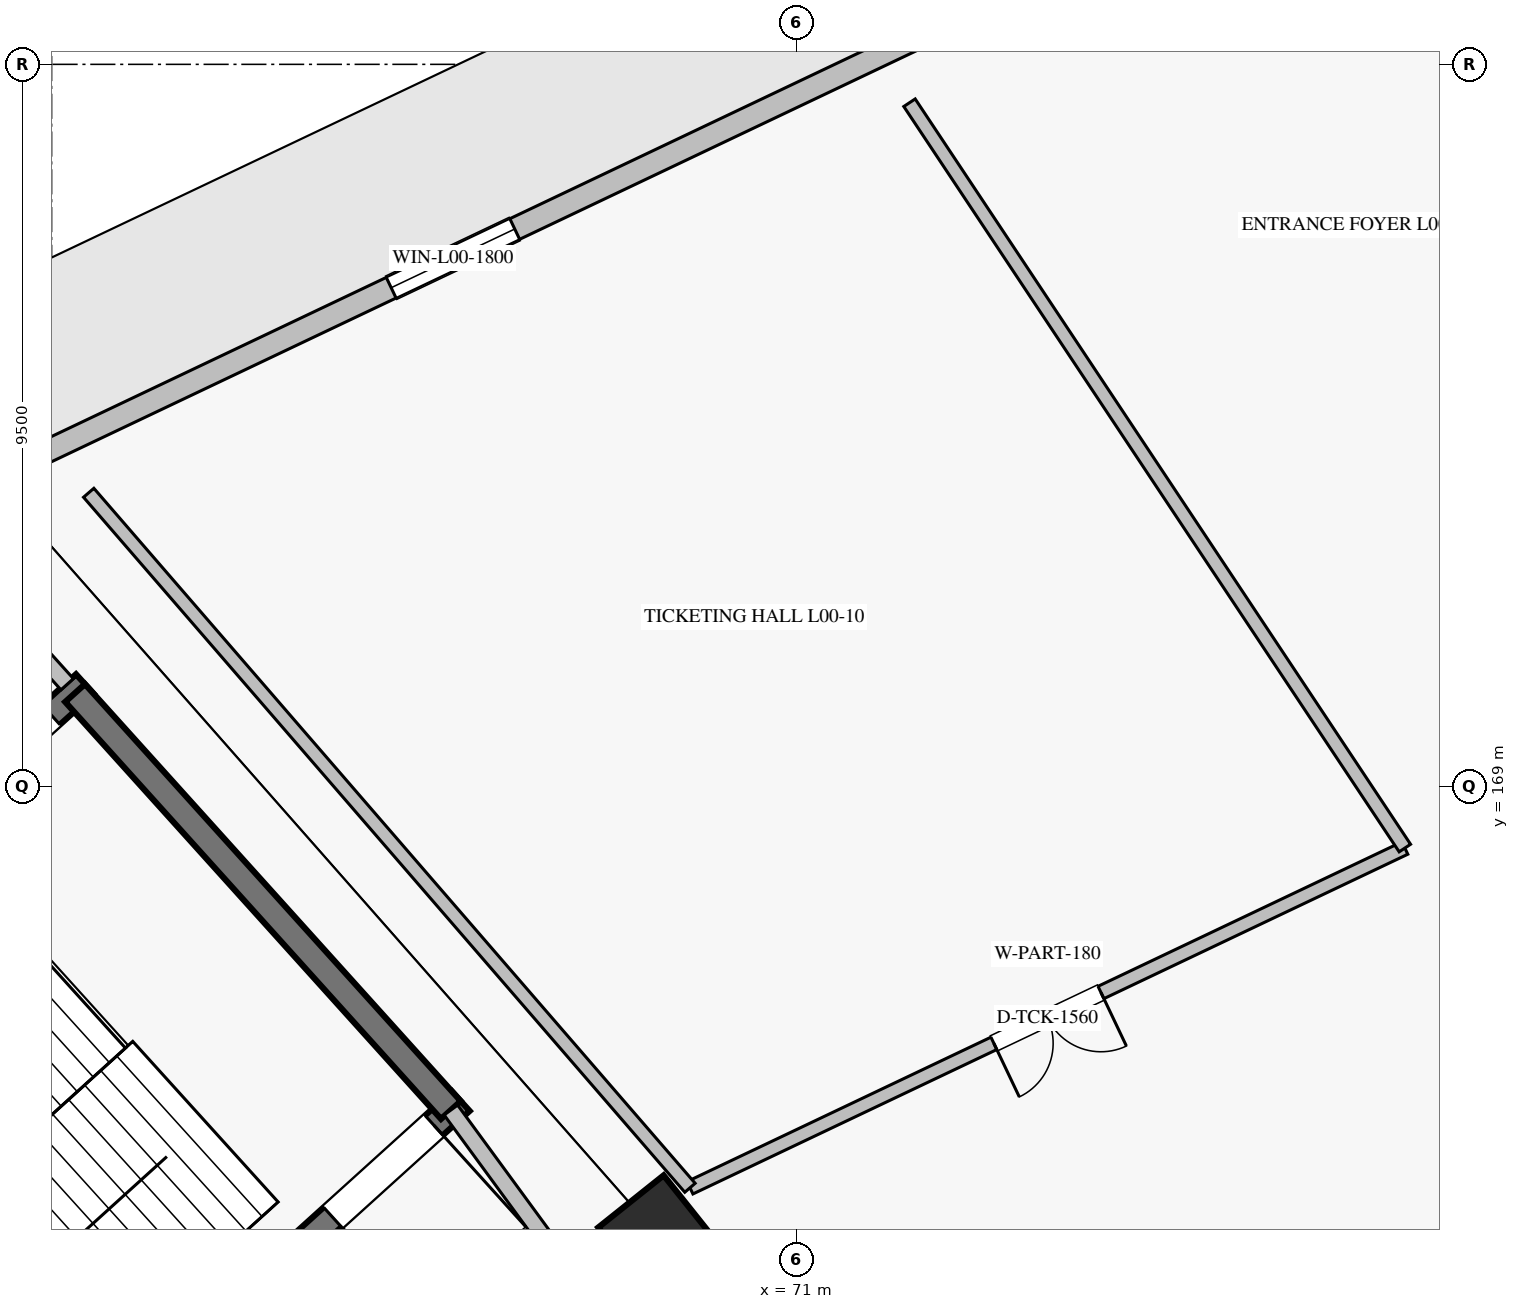
"""IFC4 building model, lengths in metres.
Left out: names, types, materials, properties, quantities, classifications, styles, units other than length and angle.
Written with IfcOpenShell. Run it as: python <this file> out.ifc"""

import sys

from ifc_helpers import new_model, si_unit, direction, frame, frame_2d, origin, origin_2d, place, context, subcontext, project, spatial, rectangle, extrude, element, fill, save


model = new_model("IFC4")
c1 = context("Model", 3, precision=1e-05, world=origin(), true_north=direction((0.0, 1.0)))
c2 = subcontext(c1, "Body", "Model", "MODEL_VIEW")
j1 = project(units=[si_unit("LENGTHUNIT", "METRE"), si_unit("PLANEANGLEUNIT", "RADIAN")], contexts=[c1])
p1 = place(None, origin())
s1 = spatial("IfcSite", under=j1, at=p1, CompositionType="ELEMENT")
p2 = place(p1, origin())
s2 = spatial("IfcBuilding", under=s1, at=p2, CompositionType="ELEMENT")
p3 = place(p2, origin())
s3 = spatial("IfcBuildingStorey", under=s2, at=p3, CompositionType="ELEMENT", Elevation=0.0)
p4 = place(p3, frame((69.166, 163.111, 0.0), z_axis=(0.0, 0.0, 1.0), x_axis=(-0.623489801853, 0.781831482473, 0.0)))
e1 = element("IfcColumn", 1, at=p4, inside=s3, PredefinedType="COLUMN", context=c2, shape_type="SweptSolid", body=[
    extrude(rectangle(XDim=1.1, YDim=1.1, at=origin_2d()), origin(), (0.0, 0.0, 1.0), 5.78),
])
p5 = place(p3, frame((79.843, 182.297, 0.0), z_axis=(0.0, 0.0, 1.0), x_axis=(-0.903214032263, -0.429190414528, 0.0)))
e2 = element("IfcWall", 2, at=p5, inside=s3, PredefinedType="SOLIDWALL", context=c2, shape_type="SweptSolid", body=[
    extrude(rectangle(XDim=21.134, YDim=0.3, at=frame_2d((10.567, 0.0))), origin(), (0.0, 0.0, 1.0), 4.8),
])
p6 = place(p5, frame((2.504, 0.0, 0.0)))
e3 = element("IfcOpeningElement", 3, at=p6, cuts=e2, PredefinedType="OPENING", context=c2, shape_type="SweptSolid", body=[
    extrude(rectangle(XDim=2.6, YDim=2.4, at=frame_2d((1.3, 1.2))), frame((0.0, 0.16, 0.0), z_axis=(0.0, -1.0, 0.0), x_axis=(1.0, 0.0, 0.0)), (0.0, 0.0, 1.0), 0.32),
])
p7 = place(p5, frame((13.894, 0.0, 1.1)))
e4 = element("IfcOpeningElement", 4, at=p7, cuts=e2, PredefinedType="OPENING", context=c2, shape_type="SweptSolid", body=[
    extrude(rectangle(XDim=1.8, YDim=1.5, at=frame_2d((0.9, 0.75))), frame((0.0, 0.16, 0.0), z_axis=(0.0, -1.0, 0.0), x_axis=(1.0, 0.0, 0.0)), (0.0, 0.0, 1.0), 0.32),
])
p8 = place(p3, frame((66.583, 164.86, 0.0), z_axis=(0.0, 0.0, 1.0), x_axis=(-0.741348929385, -0.671119784315, 0.0)))
e5 = element("IfcWall", 5, at=p8, inside=s3, PredefinedType="SHEAR", context=c2, shape_type="SweptSolid", body=[
    extrude(rectangle(XDim=11.826, YDim=0.35, at=frame_2d((5.913, 0.0))), origin(), (0.0, 0.0, 1.0), 5.5),
])
p9 = place(p8, frame((0.475, 0.0, 0.0)))
e6 = element("IfcOpeningElement", 6, at=p9, cuts=e5, PredefinedType="OPENING", context=c2, shape_type="SweptSolid", body=[
    extrude(rectangle(XDim=1.8, YDim=2.2, at=frame_2d((0.9, 1.1))), frame((0.0, 0.185, 0.0), z_axis=(0.0, -1.0, 0.0), x_axis=(1.0, 0.0, 0.0)), (0.0, 0.0, 1.0), 0.37),
])
p10 = place(p3, frame((61.639, 170.347, 0.0), z_axis=(0.0, 0.0, 1.0), x_axis=(-0.741351373721, -0.671117084183, 0.0)))
e7 = element("IfcWall", 7, at=p10, inside=s3, PredefinedType="SHEAR", context=c2, shape_type="SweptSolid", body=[
    extrude(rectangle(XDim=12.83, YDim=0.35, at=frame_2d((6.415, 0.0))), origin(), (0.0, 0.0, 1.0), 5.5),
])
p11 = place(p10, frame((0.602, 0.0, 0.0)))
e8 = element("IfcOpeningElement", 8, at=p11, cuts=e7, PredefinedType="OPENING", context=c2, shape_type="SweptSolid", body=[
    extrude(rectangle(XDim=1.8, YDim=2.2, at=frame_2d((0.9, 1.1))), frame((0.0, 0.185, 0.0), z_axis=(0.0, -1.0, 0.0), x_axis=(1.0, 0.0, 0.0)), (0.0, 0.0, 1.0), 0.37),
])
p12 = place(p3, frame((61.405, 170.344, 0.0), z_axis=(0.0, 0.0, 1.0), x_axis=(-0.669523961342, 0.742790458467, 0.0)))
e9 = element("IfcWall", 9, at=p12, inside=s3, PredefinedType="SOLIDWALL", context=c2, shape_type="SweptSolid", body=[
    extrude(rectangle(XDim=2.556, YDim=0.22, at=frame_2d((1.278, 0.0))), origin(), (0.0, 0.0, 1.0), 5.5),
])
p13 = place(p3, frame((66.454, 164.743, 0.0), z_axis=(0.0, 0.0, 1.0), x_axis=(-0.669463145673, 0.742845270958, 0.0)))
e10 = element("IfcWall", 10, at=p13, inside=s3, PredefinedType="SHEAR", context=c2, shape_type="SweptSolid", body=[
    extrude(rectangle(XDim=7.386, YDim=0.35, at=frame_2d((3.693, 0.0))), origin(), (0.0, 0.0, 1.0), 5.5),
])
p14 = place(p3, frame((68.591, 161.824, 0.0), z_axis=(0.0, 0.0, 1.0), x_axis=(-0.590836915359, 0.806791013491, 0.0)))
e11 = element("IfcWall", 11, at=p14, inside=s3, PredefinedType="SOLIDWALL", context=c2, shape_type="SweptSolid", body=[
    extrude(rectangle(XDim=3.618, YDim=0.22, at=frame_2d((1.809, 0.0))), origin(), (0.0, 0.0, 1.0), 5.5),
])
p15 = place(p3, frame((79.005, 168.189, 0.0), z_axis=(0.0, 0.0, 1.0), x_axis=(-0.903212529205, -0.42919357764, 0.0)))
e12 = element("IfcWall", 12, at=p15, inside=s3, PredefinedType="PARTITIONING", context=c2, shape_type="SweptSolid", body=[
    extrude(rectangle(XDim=10.414, YDim=0.18, at=frame_2d((5.207, 0.0))), origin(), (0.0, 0.0, 1.0), 4.82),
])
p16 = place(p15, frame((4.427, 0.0, 0.0)))
e13 = element("IfcOpeningElement", 13, at=p16, cuts=e12, PredefinedType="OPENING", context=c2, shape_type="SweptSolid", body=[
    extrude(rectangle(XDim=1.56, YDim=2.25, at=frame_2d((0.78, 1.125))), frame((0.0, 0.1, 0.0), z_axis=(0.0, -1.0, 0.0), x_axis=(1.0, 0.0, 0.0)), (0.0, 0.0, 1.0), 0.2),
])
p17 = place(p3, frame((79.005, 168.189, 0.0), z_axis=(0.0, 0.0, 1.0), x_axis=(-0.553565629172, 0.832805556057, 0.0)))
e14 = element("IfcWall", 14, at=p17, inside=s3, PredefinedType="PARTITIONING", context=c2, shape_type="SweptSolid", body=[
    extrude(rectangle(XDim=11.774, YDim=0.18, at=frame_2d((5.887, 0.0))), origin(), (0.0, 0.0, 1.0), 4.82),
])
p18 = place(p3, frame((69.599, 163.72, 0.0), z_axis=(0.0, 0.0, 1.0), x_axis=(-0.654293035882, 0.756241114458, 0.0)))
e15 = element("IfcWall", 15, at=p18, inside=s3, PredefinedType="PARTITIONING", context=c2, shape_type="SweptSolid", body=[
    extrude(rectangle(XDim=12.091, YDim=0.18, at=frame_2d((6.045, 0.0))), origin(), (0.0, 0.0, 1.0), 4.82),
])
p19 = place(p7, origin())
e16 = element("IfcWindow", 16, at=p19, inside=s3, PartitioningType="SINGLE_PANEL", PredefinedType="WINDOW", context=c2, shape_type="SweptSolid", body=[
    extrude(rectangle(XDim=1.8, YDim=1.5, at=frame_2d((0.9, 0.75))), frame((0.0, 0.03, 0.0), z_axis=(0.0, -1.0, 0.0), x_axis=(1.0, 0.0, 0.0)), (0.0, 0.0, 1.0), 0.06),
])
fill(e4, e16)
p20 = place(p11, frame((1.8, 0.0, 0.0), z_axis=(0.0, 0.0, 1.0), x_axis=(-1.0, 0.0, 0.0)))
e17 = element("IfcDoor", 17, at=p20, inside=s3, OperationType="DOUBLE_DOOR_SINGLE_SWING", PredefinedType="DOOR", context=c2, shape_type="SweptSolid", body=[
    extrude(rectangle(XDim=1.8, YDim=2.2, at=frame_2d((0.9, 1.1))), frame((0.0, 0.025, 0.0), z_axis=(0.0, -1.0, 0.0), x_axis=(1.0, 0.0, 0.0)), (0.0, 0.0, 1.0), 0.05),
])
fill(e8, e17)
p21 = place(p9, origin())
e18 = element("IfcDoor", 18, at=p21, inside=s3, OperationType="SINGLE_SWING_LEFT", PredefinedType="DOOR", context=c2, shape_type="SweptSolid", body=[
    extrude(rectangle(XDim=1.8, YDim=2.2, at=frame_2d((0.9, 1.1))), frame((0.0, 0.025, 0.0), z_axis=(0.0, -1.0, 0.0), x_axis=(1.0, 0.0, 0.0)), (0.0, 0.0, 1.0), 0.05),
])
fill(e6, e18)
p22 = place(p16, origin())
e19 = element("IfcDoor", 19, at=p22, inside=s3, OperationType="DOUBLE_DOOR_SINGLE_SWING", PredefinedType="DOOR", context=c2, shape_type="SweptSolid", body=[
    extrude(rectangle(XDim=1.56, YDim=2.25, at=frame_2d((0.78, 1.125))), frame((0.0, 0.025, 0.0), z_axis=(0.0, -1.0, 0.0), x_axis=(1.0, 0.0, 0.0)), (0.0, 0.0, 1.0), 0.05),
])
fill(e13, e19)
save(model, sys.argv[1])
